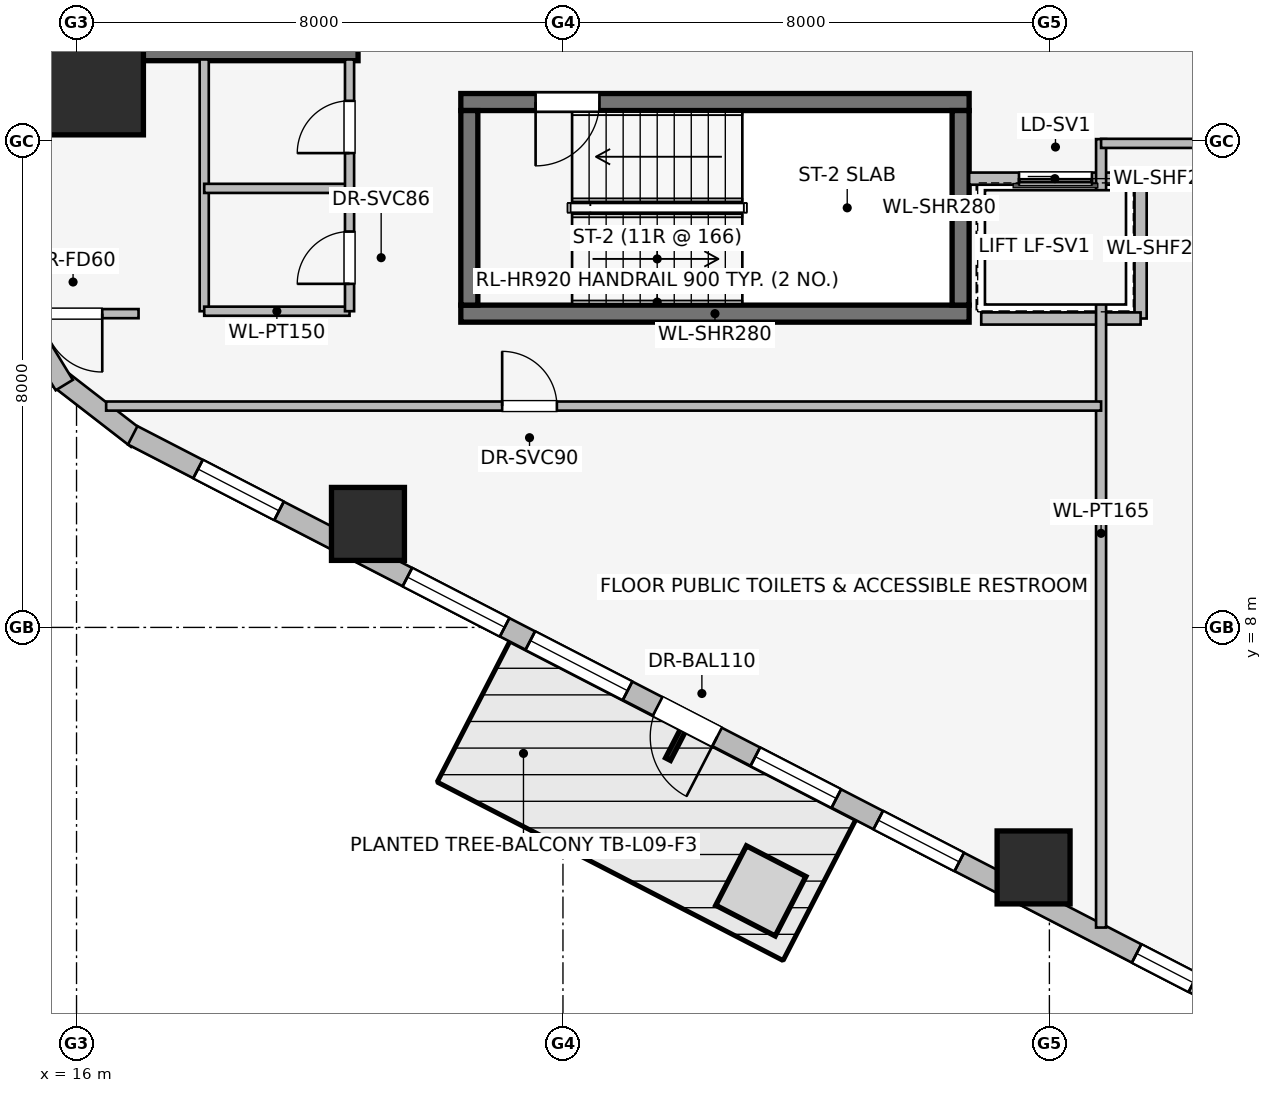
"""IFC4 building model, lengths in metres.
Left out: names, types, materials, properties, quantities, classifications, styles, units other than length and angle.
Written with IfcOpenShell. Run it as: python <this file> out.ifc"""

import sys

from ifc_helpers import new_model, si_unit, direction, frame, frame_2d, origin, origin_2d, place, context, subcontext, project, spatial, rectangle, extrude, element, fill, save


model = new_model("IFC4")
c1 = context("Model", 3, precision=1e-05, world=origin(), true_north=direction((0.0, 1.0)))
c2 = subcontext(c1, "Body", "Model", "MODEL_VIEW")
j1 = project(units=[si_unit("LENGTHUNIT", "METRE"), si_unit("PLANEANGLEUNIT", "RADIAN")], contexts=[c1])
p1 = place(None, origin())
s1 = spatial("IfcSite", under=j1, at=p1, CompositionType="ELEMENT")
p2 = place(p1, origin())
s2 = spatial("IfcBuilding", under=s1, at=p2, CompositionType="ELEMENT")
p3 = place(p2, frame((0.0, 0.0, 37.95)))
s3 = spatial("IfcBuildingStorey", under=s2, at=p3, CompositionType="ELEMENT", Elevation=37.95)
p4 = place(p3, frame((16.87, 17.46, 0.0), z_axis=(0.0, 0.0, 1.0), x_axis=(1.0, 0.0, 0.0)))
e1 = element("IfcWall", 1, at=p4, inside=s3, PredefinedType="SHEAR", context=c2, shape_type="SweptSolid", body=[
    extrude(rectangle(XDim=3.76, YDim=0.28, at=frame_2d((1.88, 0.0))), origin(), (0.0, 0.0, 1.0), 3.65),
])
p5 = place(p3, frame((22.32, 13.16, 0.0), z_axis=(0.0, 0.0, 1.0), x_axis=(1.0, 0.0, 0.0)))
e2 = element("IfcWall", 2, at=p5, inside=s3, PredefinedType="SHEAR", context=c2, shape_type="SweptSolid", body=[
    extrude(rectangle(XDim=8.36, YDim=0.28, at=frame_2d((4.18, 0.0))), origin(), (0.0, 0.0, 1.0), 3.65),
])
p6 = place(p3, frame((30.68, 16.64, 0.0), z_axis=(0.0, 0.0, 1.0), x_axis=(-1.0, 0.0, 0.0)))
e3 = element("IfcWall", 3, at=p6, inside=s3, PredefinedType="SHEAR", context=c2, shape_type="SweptSolid", body=[
    extrude(rectangle(XDim=8.36, YDim=0.28, at=frame_2d((4.18, 0.0))), origin(), (0.0, 0.0, 1.0), 3.65),
])
p7 = place(p6, frame((6.08, 0.0, 0.0)))
e4 = element("IfcOpeningElement", 4, at=p7, cuts=e3, PredefinedType="OPENING", context=c2, shape_type="SweptSolid", body=[
    extrude(rectangle(XDim=1.05, YDim=2.0, at=frame_2d((0.525, 1.0))), frame((0.0, 0.15, 0.0), z_axis=(0.0, -1.0, 0.0), x_axis=(1.0, 0.0, 0.0)), (0.0, 0.0, 1.0), 0.3),
])
for number, where, z_axis, x_axis in (
    (5, (22.46, 16.5, 0.0), (0.0, 0.0, 1.0), (0.0, -1.0, 0.0)),
    (6, (30.54, 13.3, 0.0), (0.0, 0.0, 1.0), (0.0, 1.0, 0.0)),
):
    element("IfcWall", number, at=place(p3, frame(where, z_axis=z_axis, x_axis=x_axis)), inside=s3, PredefinedType="SHEAR", context=c2, shape_type="SweptSolid", body=[
        extrude(rectangle(XDim=3.2, YDim=0.28, at=frame_2d((1.6, 0.0))), origin(), (0.0, 0.0, 1.0), 3.65),
    ])
p8 = place(p3, frame((16.3, 16.9, 0.0), z_axis=(0.0, 0.0, 1.0), x_axis=(1.0, 0.0, 0.0)))
e7 = element("IfcColumn", 7, at=p8, inside=s3, PredefinedType="COLUMN", context=c2, shape_type="SweptSolid", body=[
    extrude(rectangle(XDim=1.6, YDim=1.6, at=origin_2d()), origin(), (0.0, 0.0, 1.0), 3.65),
])
for number, where, z_axis, x_axis in (
    (8, (20.793, 9.702, 0.0), (0.0, 0.0, 1.0), (1.0, 0.0, 0.0)),
    (9, (31.74, 4.053, 0.0), (0.0, 0.0, 1.0), (1.0, 0.0, 0.0)),
):
    element("IfcColumn", number, at=place(p3, frame(where, z_axis=z_axis, x_axis=x_axis)), inside=s3, PredefinedType="COLUMN", context=c2, shape_type="SweptSolid", body=[
        extrude(rectangle(XDim=1.2, YDim=1.2, at=origin_2d()), origin(), (0.0, 0.0, 1.0), 3.65),
    ])
p9 = place(p3, frame((16.998, 11.099, 0.0), z_axis=(0.0, 0.0, 1.0), x_axis=(-0.790691856293, 0.61221433207, 0.0)))
e10 = element("IfcWall", 10, at=p9, inside=s3, PredefinedType="STANDARD", context=c2, shape_type="SweptSolid", body=[
    extrude(rectangle(XDim=1.676, YDim=0.33, at=frame_2d((0.838, 0.0))), origin(), (0.0, 0.0, 1.0), 3.39),
])
p10 = place(p3, frame((15.798, 11.985, 0.0), z_axis=(0.0, 0.0, 1.0), x_axis=(-0.520584129191, 0.853810379671, 0.0)))
e11 = element("IfcWall", 11, at=p10, inside=s3, PredefinedType="STANDARD", context=c2, shape_type="SweptSolid", body=[
    extrude(rectangle(XDim=1.677, YDim=0.33, at=frame_2d((0.838, 0.0))), origin(), (0.0, 0.0, 1.0), 3.39),
])
p11 = place(p3, frame((35.169, 1.743, 0.0), z_axis=(0.0, 0.0, 1.0), x_axis=(-0.888634413993, 0.458616264721, 0.0)))
e12 = element("IfcWall", 12, at=p11, inside=s3, PredefinedType="STANDARD", context=c2, shape_type="SweptSolid", body=[
    extrude(rectangle(XDim=20.531, YDim=0.34, at=frame_2d((10.266, 0.0))), origin(), (0.0, 0.0, 1.0), 2.684),
])
p12 = place(p11, frame((9.716, 0.0, 0.0)))
e13 = element("IfcOpeningElement", 13, at=p12, cuts=e12, PredefinedType="OPENING", context=c2, shape_type="SweptSolid", body=[
    extrude(rectangle(XDim=1.1, YDim=2.04, at=frame_2d((0.55, 1.02))), frame((0.0, 0.18, 0.0), z_axis=(0.0, -1.0, 0.0), x_axis=(1.0, 0.0, 0.0)), (0.0, 0.0, 1.0), 0.36),
])
p13 = place(p11, frame((0.902, 0.0, 0.75)))
e14 = element("IfcOpeningElement", 14, at=p13, cuts=e12, PredefinedType="OPENING", context=c2, shape_type="SweptSolid", body=[
    extrude(rectangle(XDim=1.05, YDim=1.4, at=frame_2d((0.525, 0.7))), frame((0.0, 0.18, 0.0), z_axis=(0.0, -1.0, 0.0), x_axis=(1.0, 0.0, 0.0)), (0.0, 0.0, 1.0), 0.36),
])
p14 = place(p11, frame((5.234, 0.0, 0.75)))
e15 = element("IfcOpeningElement", 15, at=p14, cuts=e12, PredefinedType="OPENING", context=c2, shape_type="SweptSolid", body=[
    extrude(rectangle(XDim=1.5, YDim=1.5, at=frame_2d((0.75, 0.75))), frame((0.0, 0.18, 0.0), z_axis=(0.0, -1.0, 0.0), x_axis=(1.0, 0.0, 0.0)), (0.0, 0.0, 1.0), 0.36),
])
p15 = place(p11, frame((7.509, 0.0, 0.75)))
e16 = element("IfcOpeningElement", 16, at=p15, cuts=e12, PredefinedType="OPENING", context=c2, shape_type="SweptSolid", body=[
    extrude(rectangle(XDim=1.5, YDim=1.5, at=frame_2d((0.75, 0.75))), frame((0.0, 0.18, 0.0), z_axis=(0.0, -1.0, 0.0), x_axis=(1.0, 0.0, 0.0)), (0.0, 0.0, 1.0), 0.36),
])
p16 = place(p11, frame((11.373, 0.0, 0.75)))
e17 = element("IfcOpeningElement", 17, at=p16, cuts=e12, PredefinedType="OPENING", context=c2, shape_type="SweptSolid", body=[
    extrude(rectangle(XDim=1.8, YDim=1.5, at=frame_2d((0.9, 0.75))), frame((0.0, 0.18, 0.0), z_axis=(0.0, -1.0, 0.0), x_axis=(1.0, 0.0, 0.0)), (0.0, 0.0, 1.0), 0.36),
])
p17 = place(p11, frame((13.648, 0.0, 0.75)))
e18 = element("IfcOpeningElement", 18, at=p17, cuts=e12, PredefinedType="OPENING", context=c2, shape_type="SweptSolid", body=[
    extrude(rectangle(XDim=1.8, YDim=1.5, at=frame_2d((0.9, 0.75))), frame((0.0, 0.18, 0.0), z_axis=(0.0, -1.0, 0.0), x_axis=(1.0, 0.0, 0.0)), (0.0, 0.0, 1.0), 0.36),
])
p18 = place(p11, frame((17.823, 0.0, 0.75)))
e19 = element("IfcOpeningElement", 19, at=p18, cuts=e12, PredefinedType="OPENING", context=c2, shape_type="SweptSolid", body=[
    extrude(rectangle(XDim=1.5, YDim=1.5, at=frame_2d((0.75, 0.75))), frame((0.0, 0.18, 0.0), z_axis=(0.0, -1.0, 0.0), x_axis=(1.0, 0.0, 0.0)), (0.0, 0.0, 1.0), 0.36),
])
p19 = place(p3, frame((33.5, 15.38, 0.0), z_axis=(0.0, 0.0, 1.0), x_axis=(-1.0, 0.0, 0.0)))
e20 = element("IfcWall", 20, at=p19, inside=s3, PredefinedType="PARTITIONING", context=c2, shape_type="SweptSolid", body=[
    extrude(rectangle(XDim=2.82, YDim=0.2, at=frame_2d((1.41, 0.0))), origin(), (0.0, 0.0, 1.0), 3.39),
])
p20 = place(p19, frame((0.8, 0.0, 0.0)))
e21 = element("IfcOpeningElement", 21, at=p20, cuts=e20, PredefinedType="OPENING", context=c2, shape_type="SweptSolid", body=[
    extrude(rectangle(XDim=1.2, YDim=2.2, at=frame_2d((0.6, 1.1))), frame((0.0, 0.11, 0.0), z_axis=(0.0, -1.0, 0.0), x_axis=(1.0, 0.0, 0.0)), (0.0, 0.0, 1.0), 0.22),
])
p21 = place(p3, frame((33.5, 13.08, 0.0), z_axis=(0.0, 0.0, 1.0), x_axis=(0.0, 1.0, 0.0)))
e22 = element("IfcWall", 22, at=p21, inside=s3, PredefinedType="PARTITIONING", context=c2, shape_type="SweptSolid", body=[
    extrude(rectangle(XDim=2.3, YDim=0.2, at=frame_2d((1.15, 0.0))), origin(), (0.0, 0.0, 1.0), 3.39),
])
p22 = place(p3, frame((30.879, 13.08, 0.0), z_axis=(0.0, 0.0, 1.0), x_axis=(1.0, 0.0, 0.0)))
e23 = element("IfcWall", 23, at=p22, inside=s3, PredefinedType="PARTITIONING", context=c2, shape_type="SweptSolid", body=[
    extrude(rectangle(XDim=2.621, YDim=0.2, at=frame_2d((1.311, 0.0))), origin(), (0.0, 0.0, 1.0), 3.39),
])
p23 = place(p3, frame((18.1, 17.34, 0.0), z_axis=(0.0, 0.0, 1.0), x_axis=(0.0, -1.0, 0.0)))
e24 = element("IfcWall", 24, at=p23, inside=s3, PredefinedType="PARTITIONING", context=c2, shape_type="SweptSolid", body=[
    extrude(rectangle(XDim=4.14, YDim=0.15, at=frame_2d((2.07, 0.0))), origin(), (0.0, 0.0, 1.0), 3.39),
])
for number, where, z_axis, x_axis in (
    (25, (18.1, 13.2, 0.0), (0.0, 0.0, 1.0), (1.0, 0.0, 0.0)),
    (26, (18.1, 15.22, 0.0), (0.0, 0.0, 1.0), (1.0, 0.0, 0.0)),
):
    element("IfcWall", number, at=place(p3, frame(where, z_axis=z_axis, x_axis=x_axis)), inside=s3, PredefinedType="PARTITIONING", context=c2, shape_type="SweptSolid", body=[
        extrude(rectangle(XDim=2.39, YDim=0.15, at=frame_2d((1.195, 0.0))), origin(), (0.0, 0.0, 1.0), 3.39),
    ])
p24 = place(p3, frame((20.49, 13.2, 0.0), z_axis=(0.0, 0.0, 1.0), x_axis=(0.0, 1.0, 0.0)))
e27 = element("IfcWall", 27, at=p24, inside=s3, PredefinedType="PARTITIONING", context=c2, shape_type="SweptSolid", body=[
    extrude(rectangle(XDim=4.14, YDim=0.15, at=frame_2d((2.07, 0.0))), origin(), (0.0, 0.0, 1.0), 3.39),
])
p25 = place(p24, frame((0.45, 0.0, 0.0)))
e28 = element("IfcOpeningElement", 28, at=p25, cuts=e27, PredefinedType="OPENING", context=c2, shape_type="SweptSolid", body=[
    extrude(rectangle(XDim=0.86, YDim=2.0, at=frame_2d((0.43, 1.0))), frame((0.0, 0.085, 0.0), z_axis=(0.0, -1.0, 0.0), x_axis=(1.0, 0.0, 0.0)), (0.0, 0.0, 1.0), 0.17),
])
p26 = place(p24, frame((2.6, 0.0, 0.0)))
e29 = element("IfcOpeningElement", 29, at=p26, cuts=e27, PredefinedType="OPENING", context=c2, shape_type="SweptSolid", body=[
    extrude(rectangle(XDim=0.86, YDim=2.0, at=frame_2d((0.43, 1.0))), frame((0.0, 0.085, 0.0), z_axis=(0.0, -1.0, 0.0), x_axis=(1.0, 0.0, 0.0)), (0.0, 0.0, 1.0), 0.17),
])
p27 = place(p3, frame((32.85, 3.064, 0.0), z_axis=(0.0, 0.0, 1.0), x_axis=(0.0, 1.0, 0.0)))
e30 = element("IfcWall", 30, at=p27, inside=s3, PredefinedType="PARTITIONING", context=c2, shape_type="SweptSolid", body=[
    extrude(rectangle(XDim=12.966, YDim=0.165, at=frame_2d((6.483, 0.0))), origin(), (0.0, 0.0, 1.0), 3.39),
])
p28 = place(p3, frame((16.487, 11.64, 0.0), z_axis=(0.0, 0.0, 1.0), x_axis=(1.0, 0.0, 0.0)))
e31 = element("IfcWall", 31, at=p28, inside=s3, PredefinedType="PARTITIONING", context=c2, shape_type="SweptSolid", body=[
    extrude(rectangle(XDim=16.363, YDim=0.15, at=frame_2d((8.182, 0.0))), origin(), (0.0, 0.0, 1.0), 3.39),
])
p29 = place(p28, frame((6.513, 0.0, 0.0)))
e32 = element("IfcOpeningElement", 32, at=p29, cuts=e31, PredefinedType="OPENING", context=c2, shape_type="SweptSolid", body=[
    extrude(rectangle(XDim=0.9, YDim=2.0, at=frame_2d((0.45, 1.0))), frame((0.0, 0.085, 0.0), z_axis=(0.0, -1.0, 0.0), x_axis=(1.0, 0.0, 0.0)), (0.0, 0.0, 1.0), 0.17),
])
p30 = place(p3, frame((17.02, 13.16, 0.0), z_axis=(0.0, 0.0, 1.0), x_axis=(-1.0, 0.0, 0.0)))
e33 = element("IfcWall", 33, at=p30, inside=s3, PredefinedType="PARTITIONING", context=c2, shape_type="SweptSolid", body=[
    extrude(rectangle(XDim=2.12, YDim=0.15, at=frame_2d((1.06, 0.0))), origin(), (0.0, 0.0, 1.0), 3.39),
])
p31 = place(p30, frame((0.597, 0.0, 0.0)))
e34 = element("IfcOpeningElement", 34, at=p31, cuts=e33, PredefinedType="OPENING", context=c2, shape_type="SweptSolid", body=[
    extrude(rectangle(XDim=0.96, YDim=2.0, at=frame_2d((0.48, 1.0))), frame((0.0, 0.085, 0.0), z_axis=(0.0, -1.0, 0.0), x_axis=(1.0, 0.0, 0.0)), (0.0, 0.0, 1.0), 0.17),
])
p32 = place(p3, frame((32.85, 15.96, 0.0), z_axis=(0.0, 0.0, 1.0), x_axis=(1.0, 0.0, 0.0)))
e35 = element("IfcWall", 35, at=p32, inside=s3, PredefinedType="PARTITIONING", context=c2, shape_type="SweptSolid", body=[
    extrude(rectangle(XDim=10.869, YDim=0.15, at=frame_2d((5.435, 0.0))), origin(), (0.0, 0.0, 1.0), 3.39),
])
p33 = place(p32, frame((4.955, 0.0, 0.0)))
e36 = element("IfcOpeningElement", 36, at=p33, cuts=e35, PredefinedType="OPENING", context=c2, shape_type="SweptSolid", body=[
    extrude(rectangle(XDim=0.96, YDim=2.0, at=frame_2d((0.48, 1.0))), frame((0.0, 0.085, 0.0), z_axis=(0.0, -1.0, 0.0), x_axis=(1.0, 0.0, 0.0)), (0.0, 0.0, 1.0), 0.17),
])
p34 = place(p12, origin())
e37 = element("IfcDoor", 37, at=p34, inside=s3, OperationType="SINGLE_SWING_LEFT", PredefinedType="DOOR", context=c2, shape_type="SweptSolid", body=[
    extrude(rectangle(XDim=1.1, YDim=2.04, at=frame_2d((0.55, 1.02))), frame((0.0, 0.025, 0.0), z_axis=(0.0, -1.0, 0.0), x_axis=(1.0, 0.0, 0.0)), (0.0, 0.0, 1.0), 0.05),
])
fill(e13, e37)
p35 = place(p13, origin())
e38 = element("IfcWindow", 38, at=p35, inside=s3, PartitioningType="SINGLE_PANEL", PredefinedType="WINDOW", context=c2, shape_type="SweptSolid", body=[
    extrude(rectangle(XDim=1.05, YDim=1.4, at=frame_2d((0.525, 0.7))), frame((0.0, 0.03, 0.0), z_axis=(0.0, -1.0, 0.0), x_axis=(1.0, 0.0, 0.0)), (0.0, 0.0, 1.0), 0.06),
])
fill(e14, e38)
p36 = place(p14, origin())
e39 = element("IfcWindow", 39, at=p36, inside=s3, PartitioningType="SINGLE_PANEL", PredefinedType="WINDOW", context=c2, shape_type="SweptSolid", body=[
    extrude(rectangle(XDim=1.5, YDim=1.5, at=frame_2d((0.75, 0.75))), frame((0.0, 0.03, 0.0), z_axis=(0.0, -1.0, 0.0), x_axis=(1.0, 0.0, 0.0)), (0.0, 0.0, 1.0), 0.06),
])
fill(e15, e39)
p37 = place(p15, origin())
e40 = element("IfcWindow", 40, at=p37, inside=s3, PartitioningType="SINGLE_PANEL", PredefinedType="WINDOW", context=c2, shape_type="SweptSolid", body=[
    extrude(rectangle(XDim=1.5, YDim=1.5, at=frame_2d((0.75, 0.75))), frame((0.0, 0.03, 0.0), z_axis=(0.0, -1.0, 0.0), x_axis=(1.0, 0.0, 0.0)), (0.0, 0.0, 1.0), 0.06),
])
fill(e16, e40)
p38 = place(p16, origin())
e41 = element("IfcWindow", 41, at=p38, inside=s3, PartitioningType="SINGLE_PANEL", PredefinedType="WINDOW", context=c2, shape_type="SweptSolid", body=[
    extrude(rectangle(XDim=1.8, YDim=1.5, at=frame_2d((0.9, 0.75))), frame((0.0, 0.03, 0.0), z_axis=(0.0, -1.0, 0.0), x_axis=(1.0, 0.0, 0.0)), (0.0, 0.0, 1.0), 0.06),
])
fill(e17, e41)
p39 = place(p17, origin())
e42 = element("IfcWindow", 42, at=p39, inside=s3, PartitioningType="SINGLE_PANEL", PredefinedType="WINDOW", context=c2, shape_type="SweptSolid", body=[
    extrude(rectangle(XDim=1.8, YDim=1.5, at=frame_2d((0.9, 0.75))), frame((0.0, 0.03, 0.0), z_axis=(0.0, -1.0, 0.0), x_axis=(1.0, 0.0, 0.0)), (0.0, 0.0, 1.0), 0.06),
])
fill(e18, e42)
p40 = place(p18, origin())
e43 = element("IfcWindow", 43, at=p40, inside=s3, PartitioningType="SINGLE_PANEL", PredefinedType="WINDOW", context=c2, shape_type="SweptSolid", body=[
    extrude(rectangle(XDim=1.5, YDim=1.5, at=frame_2d((0.75, 0.75))), frame((0.0, 0.03, 0.0), z_axis=(0.0, -1.0, 0.0), x_axis=(1.0, 0.0, 0.0)), (0.0, 0.0, 1.0), 0.06),
])
fill(e19, e43)
p41 = place(p7, origin())
e44 = element("IfcDoor", 44, at=p41, inside=s3, OperationType="SINGLE_SWING_RIGHT", PredefinedType="DOOR", context=c2, shape_type="SweptSolid", body=[
    extrude(rectangle(XDim=1.05, YDim=2.0, at=frame_2d((0.525, 1.0))), frame((0.0, 0.025, 0.0), z_axis=(0.0, -1.0, 0.0), x_axis=(1.0, 0.0, 0.0)), (0.0, 0.0, 1.0), 0.05),
])
fill(e4, e44)
p42 = place(p20, origin())
e45 = element("IfcDoor", 45, at=p42, inside=s3, OperationType="SLIDING_TO_RIGHT", PredefinedType="DOOR", context=c2, shape_type="SweptSolid", body=[
    extrude(rectangle(XDim=1.2, YDim=2.2, at=frame_2d((0.6, 1.1))), frame((0.0, 0.025, 0.0), z_axis=(0.0, -1.0, 0.0), x_axis=(1.0, 0.0, 0.0)), (0.0, 0.0, 1.0), 0.05),
])
fill(e21, e45)
p43 = place(p25, origin())
e46 = element("IfcDoor", 46, at=p43, inside=s3, OperationType="SINGLE_SWING_LEFT", PredefinedType="DOOR", context=c2, shape_type="SweptSolid", body=[
    extrude(rectangle(XDim=0.86, YDim=2.0, at=frame_2d((0.43, 1.0))), frame((0.0, 0.025, 0.0), z_axis=(0.0, -1.0, 0.0), x_axis=(1.0, 0.0, 0.0)), (0.0, 0.0, 1.0), 0.05),
])
fill(e28, e46)
p44 = place(p26, origin())
e47 = element("IfcDoor", 47, at=p44, inside=s3, OperationType="SINGLE_SWING_LEFT", PredefinedType="DOOR", context=c2, shape_type="SweptSolid", body=[
    extrude(rectangle(XDim=0.86, YDim=2.0, at=frame_2d((0.43, 1.0))), frame((0.0, 0.025, 0.0), z_axis=(0.0, -1.0, 0.0), x_axis=(1.0, 0.0, 0.0)), (0.0, 0.0, 1.0), 0.05),
])
fill(e29, e47)
p45 = place(p29, origin())
e48 = element("IfcDoor", 48, at=p45, inside=s3, OperationType="SINGLE_SWING_LEFT", PredefinedType="DOOR", context=c2, shape_type="SweptSolid", body=[
    extrude(rectangle(XDim=0.9, YDim=2.0, at=frame_2d((0.45, 1.0))), frame((0.0, 0.025, 0.0), z_axis=(0.0, -1.0, 0.0), x_axis=(1.0, 0.0, 0.0)), (0.0, 0.0, 1.0), 0.05),
])
fill(e32, e48)
p46 = place(p31, origin())
e49 = element("IfcDoor", 49, at=p46, inside=s3, OperationType="SINGLE_SWING_LEFT", PredefinedType="DOOR", context=c2, shape_type="SweptSolid", body=[
    extrude(rectangle(XDim=0.96, YDim=2.0, at=frame_2d((0.48, 1.0))), frame((0.0, 0.025, 0.0), z_axis=(0.0, -1.0, 0.0), x_axis=(1.0, 0.0, 0.0)), (0.0, 0.0, 1.0), 0.05),
])
fill(e34, e49)
save(model, sys.argv[1])
